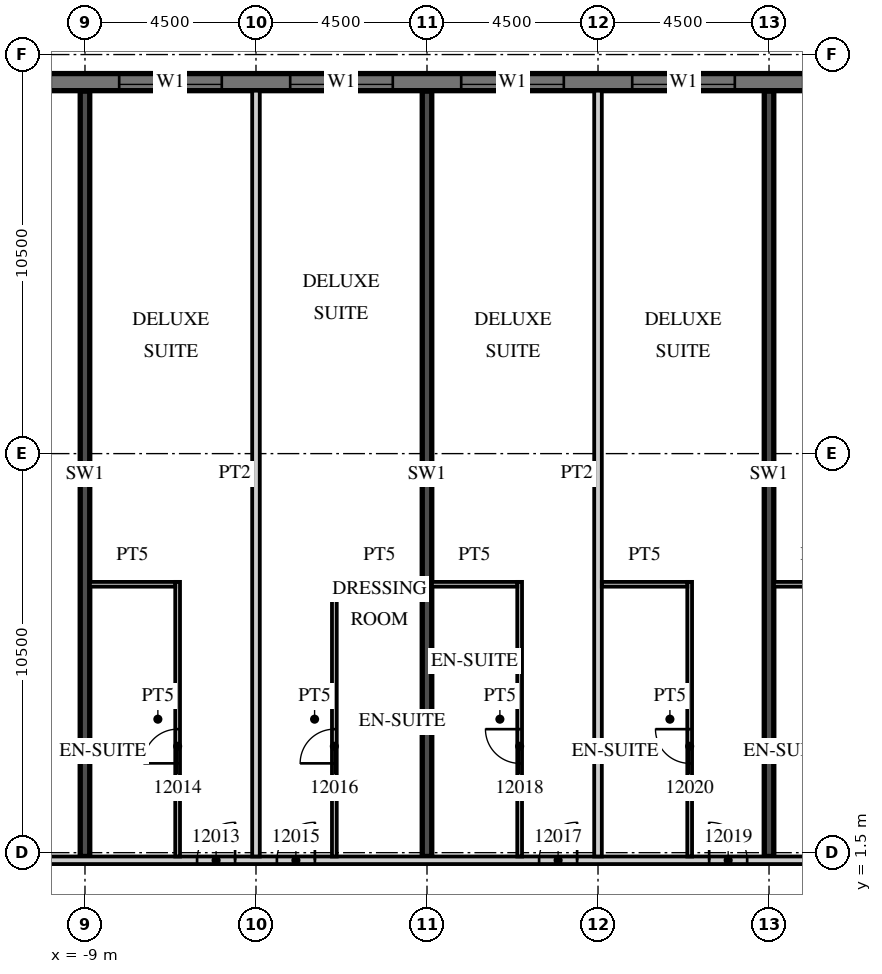
"""IFC4 building model, lengths in metres.
Left out: names, types, materials, properties, quantities, classifications, styles, units other than length and angle.
Written with IfcOpenShell. Run it as: python <this file> out.ifc"""

import sys

from ifc_helpers import new_model, si_unit, direction, frame, frame_2d, origin, place, context, subcontext, project, spatial, rectangle, extrude, element, fill, save


model = new_model("IFC4")
c1 = context("Model", 3, precision=1e-05, world=origin(), true_north=direction((0.0, 1.0)))
c2 = subcontext(c1, "Body", "Model", "MODEL_VIEW")
j1 = project(units=[si_unit("LENGTHUNIT", "METRE"), si_unit("PLANEANGLEUNIT", "RADIAN")], contexts=[c1])
p1 = place(None, origin())
s1 = spatial("IfcSite", under=j1, at=p1, CompositionType="ELEMENT")
p2 = place(p1, origin())
s2 = spatial("IfcBuilding", under=s1, at=p2, CompositionType="ELEMENT")
p3 = place(p2, frame((0.0, 0.0, 69.9)))
s3 = spatial("IfcBuildingStorey", under=s2, at=p3, CompositionType="ELEMENT", Elevation=69.9)
for number, where, z_axis, x_axis in (
    (1, (-9.0, 1.4, 0.0), (0.0, 0.0, 1.0), (0.0, 1.0, 0.0)),
    (2, (0.0, 1.4, 0.0), (0.0, 0.0, 1.0), (0.0, 1.0, 0.0)),
    (3, (9.0, 1.4, 0.0), (0.0, 0.0, 1.0), (0.0, 1.0, 0.0)),
):
    element("IfcWall", number, at=place(p3, frame(where, z_axis=z_axis, x_axis=x_axis)), inside=s3, PredefinedType="SHEAR", context=c2, shape_type="SweptSolid", body=[
        extrude(rectangle(XDim=20.14, YDim=0.25, at=frame_2d((10.07, 0.0))), origin(), (0.0, 0.0, 1.0), 3.3),
    ])
p4 = place(p3, frame((13.5, 21.775, 0.0), z_axis=(0.0, 0.0, 1.0), x_axis=(-1.0, 0.0, 0.0)))
e4 = element("IfcWall", 4, at=p4, inside=s3, PredefinedType="SOLIDWALL", context=c2, shape_type="SweptSolid", body=[
    extrude(rectangle(XDim=54.5, YDim=0.45, at=frame_2d((27.25, 0.0))), origin(), (0.0, 0.0, 1.0), 3.02),
])
p5 = place(p4, frame((0.9, 0.0, 0.45)))
e5 = element("IfcOpeningElement", 5, at=p5, cuts=e4, PredefinedType="OPENING", context=c2, shape_type="SweptSolid", body=[
    extrude(rectangle(XDim=2.7, YDim=2.25, at=frame_2d((1.35, 1.125))), frame((0.0, 0.235, 0.0), z_axis=(0.0, -1.0, 0.0), x_axis=(1.0, 0.0, 0.0)), (0.0, 0.0, 1.0), 0.47),
])
p6 = place(p4, frame((5.4, 0.0, 0.45)))
e6 = element("IfcOpeningElement", 6, at=p6, cuts=e4, PredefinedType="OPENING", context=c2, shape_type="SweptSolid", body=[
    extrude(rectangle(XDim=2.7, YDim=2.25, at=frame_2d((1.35, 1.125))), frame((0.0, 0.235, 0.0), z_axis=(0.0, -1.0, 0.0), x_axis=(1.0, 0.0, 0.0)), (0.0, 0.0, 1.0), 0.47),
])
p7 = place(p4, frame((9.9, 0.0, 0.45)))
e7 = element("IfcOpeningElement", 7, at=p7, cuts=e4, PredefinedType="OPENING", context=c2, shape_type="SweptSolid", body=[
    extrude(rectangle(XDim=2.7, YDim=2.25, at=frame_2d((1.35, 1.125))), frame((0.0, 0.235, 0.0), z_axis=(0.0, -1.0, 0.0), x_axis=(1.0, 0.0, 0.0)), (0.0, 0.0, 1.0), 0.47),
])
p8 = place(p4, frame((14.4, 0.0, 0.45)))
e8 = element("IfcOpeningElement", 8, at=p8, cuts=e4, PredefinedType="OPENING", context=c2, shape_type="SweptSolid", body=[
    extrude(rectangle(XDim=2.7, YDim=2.25, at=frame_2d((1.35, 1.125))), frame((0.0, 0.235, 0.0), z_axis=(0.0, -1.0, 0.0), x_axis=(1.0, 0.0, 0.0)), (0.0, 0.0, 1.0), 0.47),
])
p9 = place(p4, frame((18.9, 0.0, 0.45)))
e9 = element("IfcOpeningElement", 9, at=p9, cuts=e4, PredefinedType="OPENING", context=c2, shape_type="SweptSolid", body=[
    extrude(rectangle(XDim=2.7, YDim=2.25, at=frame_2d((1.35, 1.125))), frame((0.0, 0.235, 0.0), z_axis=(0.0, -1.0, 0.0), x_axis=(1.0, 0.0, 0.0)), (0.0, 0.0, 1.0), 0.47),
])
p10 = place(p4, frame((23.4, 0.0, 0.45)))
e10 = element("IfcOpeningElement", 10, at=p10, cuts=e4, PredefinedType="OPENING", context=c2, shape_type="SweptSolid", body=[
    extrude(rectangle(XDim=2.7, YDim=2.25, at=frame_2d((1.35, 1.125))), frame((0.0, 0.235, 0.0), z_axis=(0.0, -1.0, 0.0), x_axis=(1.0, 0.0, 0.0)), (0.0, 0.0, 1.0), 0.47),
])
p11 = place(p4, frame((27.9, 0.0, 0.45)))
e11 = element("IfcOpeningElement", 11, at=p11, cuts=e4, PredefinedType="OPENING", context=c2, shape_type="SweptSolid", body=[
    extrude(rectangle(XDim=2.7, YDim=2.25, at=frame_2d((1.35, 1.125))), frame((0.0, 0.235, 0.0), z_axis=(0.0, -1.0, 0.0), x_axis=(1.0, 0.0, 0.0)), (0.0, 0.0, 1.0), 0.47),
])
p12 = place(p4, frame((32.4, 0.0, 0.45)))
e12 = element("IfcOpeningElement", 12, at=p12, cuts=e4, PredefinedType="OPENING", context=c2, shape_type="SweptSolid", body=[
    extrude(rectangle(XDim=2.7, YDim=2.25, at=frame_2d((1.35, 1.125))), frame((0.0, 0.235, 0.0), z_axis=(0.0, -1.0, 0.0), x_axis=(1.0, 0.0, 0.0)), (0.0, 0.0, 1.0), 0.47),
])
p13 = place(p4, frame((36.9, 0.0, 0.45)))
e13 = element("IfcOpeningElement", 13, at=p13, cuts=e4, PredefinedType="OPENING", context=c2, shape_type="SweptSolid", body=[
    extrude(rectangle(XDim=2.7, YDim=2.25, at=frame_2d((1.35, 1.125))), frame((0.0, 0.235, 0.0), z_axis=(0.0, -1.0, 0.0), x_axis=(1.0, 0.0, 0.0)), (0.0, 0.0, 1.0), 0.47),
])
p14 = place(p4, frame((41.4, 0.0, 0.45)))
e14 = element("IfcOpeningElement", 14, at=p14, cuts=e4, PredefinedType="OPENING", context=c2, shape_type="SweptSolid", body=[
    extrude(rectangle(XDim=2.7, YDim=2.25, at=frame_2d((1.35, 1.125))), frame((0.0, 0.235, 0.0), z_axis=(0.0, -1.0, 0.0), x_axis=(1.0, 0.0, 0.0)), (0.0, 0.0, 1.0), 0.47),
])
p15 = place(p4, frame((45.9, 0.0, 0.45)))
e15 = element("IfcOpeningElement", 15, at=p15, cuts=e4, PredefinedType="OPENING", context=c2, shape_type="SweptSolid", body=[
    extrude(rectangle(XDim=2.7, YDim=2.25, at=frame_2d((1.35, 1.125))), frame((0.0, 0.235, 0.0), z_axis=(0.0, -1.0, 0.0), x_axis=(1.0, 0.0, 0.0)), (0.0, 0.0, 1.0), 0.47),
])
p16 = place(p4, frame((50.4, 0.0, 0.45)))
e16 = element("IfcOpeningElement", 16, at=p16, cuts=e4, PredefinedType="OPENING", context=c2, shape_type="SweptSolid", body=[
    extrude(rectangle(XDim=2.7, YDim=2.25, at=frame_2d((1.35, 1.125))), frame((0.0, 0.235, 0.0), z_axis=(0.0, -1.0, 0.0), x_axis=(1.0, 0.0, 0.0)), (0.0, 0.0, 1.0), 0.47),
])
p17 = place(p3, frame((-44.55, 1.3, 0.0), z_axis=(0.0, 0.0, 1.0), x_axis=(1.0, 0.0, 0.0)))
e17 = element("IfcWall", 17, at=p17, inside=s3, PredefinedType="PARTITIONING", context=c2, shape_type="SweptSolid", body=[
    extrude(rectangle(XDim=58.05, YDim=0.2, at=frame_2d((29.025, 0.0))), origin(), (0.0, 0.0, 1.0), 3.02),
])
p18 = place(p17, frame((0.525, 0.0, 0.0)))
e18 = element("IfcOpeningElement", 18, at=p18, cuts=e17, PredefinedType="OPENING", context=c2, shape_type="SweptSolid", body=[
    extrude(rectangle(XDim=1.0, YDim=2.1, at=frame_2d((0.5, 1.05))), frame((0.0, 0.11, 0.0), z_axis=(0.0, -1.0, 0.0), x_axis=(1.0, 0.0, 0.0)), (0.0, 0.0, 1.0), 0.22),
])
p19 = place(p17, frame((6.975, 0.0, 0.0)))
e19 = element("IfcOpeningElement", 19, at=p19, cuts=e17, PredefinedType="OPENING", context=c2, shape_type="SweptSolid", body=[
    extrude(rectangle(XDim=1.0, YDim=2.1, at=frame_2d((0.5, 1.05))), frame((0.0, 0.11, 0.0), z_axis=(0.0, -1.0, 0.0), x_axis=(1.0, 0.0, 0.0)), (0.0, 0.0, 1.0), 0.22),
])
p20 = place(p17, frame((9.125, 0.0, 0.0)))
e20 = element("IfcOpeningElement", 20, at=p20, cuts=e17, PredefinedType="OPENING", context=c2, shape_type="SweptSolid", body=[
    extrude(rectangle(XDim=1.0, YDim=2.1, at=frame_2d((0.5, 1.05))), frame((0.0, 0.11, 0.0), z_axis=(0.0, -1.0, 0.0), x_axis=(1.0, 0.0, 0.0)), (0.0, 0.0, 1.0), 0.22),
])
p21 = place(p17, frame((13.6, 0.0, 0.0)))
e21 = element("IfcOpeningElement", 21, at=p21, cuts=e17, PredefinedType="OPENING", context=c2, shape_type="SweptSolid", body=[
    extrude(rectangle(XDim=1.0, YDim=2.1, at=frame_2d((0.5, 1.05))), frame((0.0, 0.11, 0.0), z_axis=(0.0, -1.0, 0.0), x_axis=(1.0, 0.0, 0.0)), (0.0, 0.0, 1.0), 0.22),
])
p22 = place(p17, frame((19.987, 0.0, 0.0)))
e22 = element("IfcOpeningElement", 22, at=p22, cuts=e17, PredefinedType="OPENING", context=c2, shape_type="SweptSolid", body=[
    extrude(rectangle(XDim=1.2, YDim=2.1, at=frame_2d((0.6, 1.05))), frame((0.0, 0.11, 0.0), z_axis=(0.0, -1.0, 0.0), x_axis=(1.0, 0.0, 0.0)), (0.0, 0.0, 1.0), 0.22),
])
p23 = place(p17, frame((31.912, 0.0, 0.0)))
e23 = element("IfcOpeningElement", 23, at=p23, cuts=e17, PredefinedType="OPENING", context=c2, shape_type="SweptSolid", body=[
    extrude(rectangle(XDim=1.2, YDim=2.1, at=frame_2d((0.6, 1.05))), frame((0.0, 0.11, 0.0), z_axis=(0.0, -1.0, 0.0), x_axis=(1.0, 0.0, 0.0)), (0.0, 0.0, 1.0), 0.22),
])
p24 = place(p17, frame((38.5, 0.0, 0.0)))
e24 = element("IfcOpeningElement", 24, at=p24, cuts=e17, PredefinedType="OPENING", context=c2, shape_type="SweptSolid", body=[
    extrude(rectangle(XDim=1.0, YDim=2.1, at=frame_2d((0.5, 1.05))), frame((0.0, 0.11, 0.0), z_axis=(0.0, -1.0, 0.0), x_axis=(1.0, 0.0, 0.0)), (0.0, 0.0, 1.0), 0.22),
])
p25 = place(p17, frame((40.6, 0.0, 0.0)))
e25 = element("IfcOpeningElement", 25, at=p25, cuts=e17, PredefinedType="OPENING", context=c2, shape_type="SweptSolid", body=[
    extrude(rectangle(XDim=1.0, YDim=2.1, at=frame_2d((0.5, 1.05))), frame((0.0, 0.11, 0.0), z_axis=(0.0, -1.0, 0.0), x_axis=(1.0, 0.0, 0.0)), (0.0, 0.0, 1.0), 0.22),
])
p26 = place(p17, frame((47.5, 0.0, 0.0)))
e26 = element("IfcOpeningElement", 26, at=p26, cuts=e17, PredefinedType="OPENING", context=c2, shape_type="SweptSolid", body=[
    extrude(rectangle(XDim=1.0, YDim=2.1, at=frame_2d((0.5, 1.05))), frame((0.0, 0.11, 0.0), z_axis=(0.0, -1.0, 0.0), x_axis=(1.0, 0.0, 0.0)), (0.0, 0.0, 1.0), 0.22),
])
p27 = place(p17, frame((51.975, 0.0, 0.0)))
e27 = element("IfcOpeningElement", 27, at=p27, cuts=e17, PredefinedType="OPENING", context=c2, shape_type="SweptSolid", body=[
    extrude(rectangle(XDim=1.0, YDim=2.1, at=frame_2d((0.5, 1.05))), frame((0.0, 0.11, 0.0), z_axis=(0.0, -1.0, 0.0), x_axis=(1.0, 0.0, 0.0)), (0.0, 0.0, 1.0), 0.22),
])
p28 = place(p17, frame((56.475, 0.0, 0.0)))
e28 = element("IfcOpeningElement", 28, at=p28, cuts=e17, PredefinedType="OPENING", context=c2, shape_type="SweptSolid", body=[
    extrude(rectangle(XDim=1.0, YDim=2.1, at=frame_2d((0.5, 1.05))), frame((0.0, 0.11, 0.0), z_axis=(0.0, -1.0, 0.0), x_axis=(1.0, 0.0, 0.0)), (0.0, 0.0, 1.0), 0.22),
])
p29 = place(p3, frame((-4.5, 1.4, 0.0), z_axis=(0.0, 0.0, 1.0), x_axis=(0.0, 1.0, 0.0)))
e29 = element("IfcWall", 29, at=p29, inside=s3, PredefinedType="PARTITIONING", context=c2, shape_type="SweptSolid", body=[
    extrude(rectangle(XDim=20.15, YDim=0.2, at=frame_2d((10.075, 0.0))), origin(), (0.0, 0.0, 1.0), 3.02),
])
p30 = place(p3, frame((-6.562, 1.4, 0.0), z_axis=(0.0, 0.0, 1.0), x_axis=(0.0, 1.0, 0.0)))
e30 = element("IfcWall", 30, at=p30, inside=s3, PredefinedType="PARTITIONING", context=c2, shape_type="SweptSolid", body=[
    extrude(rectangle(XDim=7.225, YDim=0.125, at=frame_2d((3.613, 0.0))), origin(), (0.0, 0.0, 1.0), 3.02),
])
p31 = place(p30, frame((2.45, 0.0, 0.0)))
e31 = element("IfcOpeningElement", 31, at=p31, cuts=e30, PredefinedType="OPENING", context=c2, shape_type="SweptSolid", body=[
    extrude(rectangle(XDim=0.9, YDim=2.1, at=frame_2d((0.45, 1.05))), frame((0.0, 0.073, 0.0), z_axis=(0.0, -1.0, 0.0), x_axis=(1.0, 0.0, 0.0)), (0.0, 0.0, 1.0), 0.145),
])
p32 = place(p3, frame((-8.875, 8.562, 0.0), z_axis=(0.0, 0.0, 1.0), x_axis=(1.0, 0.0, 0.0)))
e32 = element("IfcWall", 32, at=p32, inside=s3, PredefinedType="PARTITIONING", context=c2, shape_type="SweptSolid", body=[
    extrude(rectangle(XDim=2.25, YDim=0.125, at=frame_2d((1.125, 0.0))), origin(), (0.0, 0.0, 1.0), 3.02),
])
p33 = place(p3, frame((-2.438, 1.4, 0.0), z_axis=(0.0, 0.0, 1.0), x_axis=(0.0, 1.0, 0.0)))
e33 = element("IfcWall", 33, at=p33, inside=s3, PredefinedType="PARTITIONING", context=c2, shape_type="SweptSolid", body=[
    extrude(rectangle(XDim=7.225, YDim=0.125, at=frame_2d((3.613, 0.0))), origin(), (0.0, 0.0, 1.0), 3.02),
])
p34 = place(p33, frame((2.45, 0.0, 0.0)))
e34 = element("IfcOpeningElement", 34, at=p34, cuts=e33, PredefinedType="OPENING", context=c2, shape_type="SweptSolid", body=[
    extrude(rectangle(XDim=0.9, YDim=2.1, at=frame_2d((0.45, 1.05))), frame((0.0, 0.073, 0.0), z_axis=(0.0, -1.0, 0.0), x_axis=(1.0, 0.0, 0.0)), (0.0, 0.0, 1.0), 0.145),
])
p35 = place(p3, frame((-2.375, 8.562, 0.0), z_axis=(0.0, 0.0, 1.0), x_axis=(1.0, 0.0, 0.0)))
e35 = element("IfcWall", 35, at=p35, inside=s3, PredefinedType="PARTITIONING", context=c2, shape_type="SweptSolid", body=[
    extrude(rectangle(XDim=2.25, YDim=0.125, at=frame_2d((1.125, 0.0))), origin(), (0.0, 0.0, 1.0), 3.02),
])
p36 = place(p3, frame((4.5, 1.4, 0.0), z_axis=(0.0, 0.0, 1.0), x_axis=(0.0, 1.0, 0.0)))
e36 = element("IfcWall", 36, at=p36, inside=s3, PredefinedType="PARTITIONING", context=c2, shape_type="SweptSolid", body=[
    extrude(rectangle(XDim=20.15, YDim=0.2, at=frame_2d((10.075, 0.0))), origin(), (0.0, 0.0, 1.0), 3.02),
])
p37 = place(p3, frame((2.438, 1.4, 0.0), z_axis=(0.0, 0.0, 1.0), x_axis=(0.0, 1.0, 0.0)))
e37 = element("IfcWall", 37, at=p37, inside=s3, PredefinedType="PARTITIONING", context=c2, shape_type="SweptSolid", body=[
    extrude(rectangle(XDim=7.225, YDim=0.125, at=frame_2d((3.613, 0.0))), origin(), (0.0, 0.0, 1.0), 3.02),
])
p38 = place(p37, frame((2.45, 0.0, 0.0)))
e38 = element("IfcOpeningElement", 38, at=p38, cuts=e37, PredefinedType="OPENING", context=c2, shape_type="SweptSolid", body=[
    extrude(rectangle(XDim=0.9, YDim=2.1, at=frame_2d((0.45, 1.05))), frame((0.0, 0.073, 0.0), z_axis=(0.0, -1.0, 0.0), x_axis=(1.0, 0.0, 0.0)), (0.0, 0.0, 1.0), 0.145),
])
p39 = place(p3, frame((0.125, 8.562, 0.0), z_axis=(0.0, 0.0, 1.0), x_axis=(1.0, 0.0, 0.0)))
e39 = element("IfcWall", 39, at=p39, inside=s3, PredefinedType="PARTITIONING", context=c2, shape_type="SweptSolid", body=[
    extrude(rectangle(XDim=2.25, YDim=0.125, at=frame_2d((1.125, 0.0))), origin(), (0.0, 0.0, 1.0), 3.02),
])
p40 = place(p3, frame((6.912, 1.4, 0.0), z_axis=(0.0, 0.0, 1.0), x_axis=(0.0, 1.0, 0.0)))
e40 = element("IfcWall", 40, at=p40, inside=s3, PredefinedType="PARTITIONING", context=c2, shape_type="SweptSolid", body=[
    extrude(rectangle(XDim=7.225, YDim=0.125, at=frame_2d((3.613, 0.0))), origin(), (0.0, 0.0, 1.0), 3.02),
])
p41 = place(p40, frame((2.45, 0.0, 0.0)))
e41 = element("IfcOpeningElement", 41, at=p41, cuts=e40, PredefinedType="OPENING", context=c2, shape_type="SweptSolid", body=[
    extrude(rectangle(XDim=0.9, YDim=2.1, at=frame_2d((0.45, 1.05))), frame((0.0, 0.073, 0.0), z_axis=(0.0, -1.0, 0.0), x_axis=(1.0, 0.0, 0.0)), (0.0, 0.0, 1.0), 0.145),
])
for number, where, z_axis, x_axis in (
    (42, (4.6, 8.562, 0.0), (0.0, 0.0, 1.0), (1.0, 0.0, 0.0)),
    (43, (9.125, 8.562, 0.0), (0.0, 0.0, 1.0), (1.0, 0.0, 0.0)),
):
    element("IfcWall", number, at=place(p3, frame(where, z_axis=z_axis, x_axis=x_axis)), inside=s3, PredefinedType="PARTITIONING", context=c2, shape_type="SweptSolid", body=[
        extrude(rectangle(XDim=2.25, YDim=0.125, at=frame_2d((1.125, 0.0))), origin(), (0.0, 0.0, 1.0), 3.02),
    ])
p42 = place(p6, origin())
e44 = element("IfcWindow", 44, at=p42, inside=s3, PartitioningType="SINGLE_PANEL", PredefinedType="WINDOW", context=c2, shape_type="SweptSolid", body=[
    extrude(rectangle(XDim=2.7, YDim=2.25, at=frame_2d((1.35, 1.125))), frame((0.0, 0.09, 0.0), z_axis=(0.0, -1.0, 0.0), x_axis=(1.0, 0.0, 0.0)), (0.0, 0.0, 1.0), 0.06),
])
fill(e6, e44)
p43 = place(p7, origin())
e45 = element("IfcWindow", 45, at=p43, inside=s3, PartitioningType="SINGLE_PANEL", PredefinedType="WINDOW", context=c2, shape_type="SweptSolid", body=[
    extrude(rectangle(XDim=2.7, YDim=2.25, at=frame_2d((1.35, 1.125))), frame((0.0, 0.09, 0.0), z_axis=(0.0, -1.0, 0.0), x_axis=(1.0, 0.0, 0.0)), (0.0, 0.0, 1.0), 0.06),
])
fill(e7, e45)
p44 = place(p8, origin())
e46 = element("IfcWindow", 46, at=p44, inside=s3, PartitioningType="SINGLE_PANEL", PredefinedType="WINDOW", context=c2, shape_type="SweptSolid", body=[
    extrude(rectangle(XDim=2.7, YDim=2.25, at=frame_2d((1.35, 1.125))), frame((0.0, 0.09, 0.0), z_axis=(0.0, -1.0, 0.0), x_axis=(1.0, 0.0, 0.0)), (0.0, 0.0, 1.0), 0.06),
])
fill(e8, e46)
p45 = place(p9, origin())
e47 = element("IfcWindow", 47, at=p45, inside=s3, PartitioningType="SINGLE_PANEL", PredefinedType="WINDOW", context=c2, shape_type="SweptSolid", body=[
    extrude(rectangle(XDim=2.7, YDim=2.25, at=frame_2d((1.35, 1.125))), frame((0.0, 0.09, 0.0), z_axis=(0.0, -1.0, 0.0), x_axis=(1.0, 0.0, 0.0)), (0.0, 0.0, 1.0), 0.06),
])
fill(e9, e47)
p46 = place(p24, origin())
e48 = element("IfcDoor", 48, at=p46, inside=s3, OperationType="SINGLE_SWING_RIGHT", PredefinedType="DOOR", context=c2, shape_type="SweptSolid", body=[
    extrude(rectangle(XDim=1.0, YDim=2.1, at=frame_2d((0.5, 1.05))), frame((0.0, 0.025, 0.0), z_axis=(0.0, -1.0, 0.0), x_axis=(1.0, 0.0, 0.0)), (0.0, 0.0, 1.0), 0.05),
])
fill(e24, e48)
p47 = place(p31, origin())
e49 = element("IfcDoor", 49, at=p47, inside=s3, OperationType="SINGLE_SWING_LEFT", PredefinedType="DOOR", context=c2, shape_type="SweptSolid", body=[
    extrude(rectangle(XDim=0.9, YDim=2.1, at=frame_2d((0.45, 1.05))), frame((0.0, 0.025, 0.0), z_axis=(0.0, -1.0, 0.0), x_axis=(1.0, 0.0, 0.0)), (0.0, 0.0, 1.0), 0.05),
])
fill(e31, e49)
p48 = place(p25, origin())
e50 = element("IfcDoor", 50, at=p48, inside=s3, OperationType="SINGLE_SWING_RIGHT", PredefinedType="DOOR", context=c2, shape_type="SweptSolid", body=[
    extrude(rectangle(XDim=1.0, YDim=2.1, at=frame_2d((0.5, 1.05))), frame((0.0, 0.025, 0.0), z_axis=(0.0, -1.0, 0.0), x_axis=(1.0, 0.0, 0.0)), (0.0, 0.0, 1.0), 0.05),
])
fill(e25, e50)
p49 = place(p34, origin())
e51 = element("IfcDoor", 51, at=p49, inside=s3, OperationType="SINGLE_SWING_LEFT", PredefinedType="DOOR", context=c2, shape_type="SweptSolid", body=[
    extrude(rectangle(XDim=0.9, YDim=2.1, at=frame_2d((0.45, 1.05))), frame((0.0, 0.025, 0.0), z_axis=(0.0, -1.0, 0.0), x_axis=(1.0, 0.0, 0.0)), (0.0, 0.0, 1.0), 0.05),
])
fill(e34, e51)
p50 = place(p26, origin())
e52 = element("IfcDoor", 52, at=p50, inside=s3, OperationType="SINGLE_SWING_RIGHT", PredefinedType="DOOR", context=c2, shape_type="SweptSolid", body=[
    extrude(rectangle(XDim=1.0, YDim=2.1, at=frame_2d((0.5, 1.05))), frame((0.0, 0.025, 0.0), z_axis=(0.0, -1.0, 0.0), x_axis=(1.0, 0.0, 0.0)), (0.0, 0.0, 1.0), 0.05),
])
fill(e26, e52)
p51 = place(p38, origin())
e53 = element("IfcDoor", 53, at=p51, inside=s3, OperationType="SINGLE_SWING_RIGHT", PredefinedType="DOOR", context=c2, shape_type="SweptSolid", body=[
    extrude(rectangle(XDim=0.9, YDim=2.1, at=frame_2d((0.45, 1.05))), frame((0.0, 0.025, 0.0), z_axis=(0.0, -1.0, 0.0), x_axis=(1.0, 0.0, 0.0)), (0.0, 0.0, 1.0), 0.05),
])
fill(e38, e53)
p52 = place(p27, origin())
e54 = element("IfcDoor", 54, at=p52, inside=s3, OperationType="SINGLE_SWING_LEFT", PredefinedType="DOOR", context=c2, shape_type="SweptSolid", body=[
    extrude(rectangle(XDim=1.0, YDim=2.1, at=frame_2d((0.5, 1.05))), frame((0.0, 0.025, 0.0), z_axis=(0.0, -1.0, 0.0), x_axis=(1.0, 0.0, 0.0)), (0.0, 0.0, 1.0), 0.05),
])
fill(e27, e54)
p53 = place(p41, origin())
e55 = element("IfcDoor", 55, at=p53, inside=s3, OperationType="SINGLE_SWING_RIGHT", PredefinedType="DOOR", context=c2, shape_type="SweptSolid", body=[
    extrude(rectangle(XDim=0.9, YDim=2.1, at=frame_2d((0.45, 1.05))), frame((0.0, 0.025, 0.0), z_axis=(0.0, -1.0, 0.0), x_axis=(1.0, 0.0, 0.0)), (0.0, 0.0, 1.0), 0.05),
])
fill(e41, e55)
save(model, sys.argv[1])
